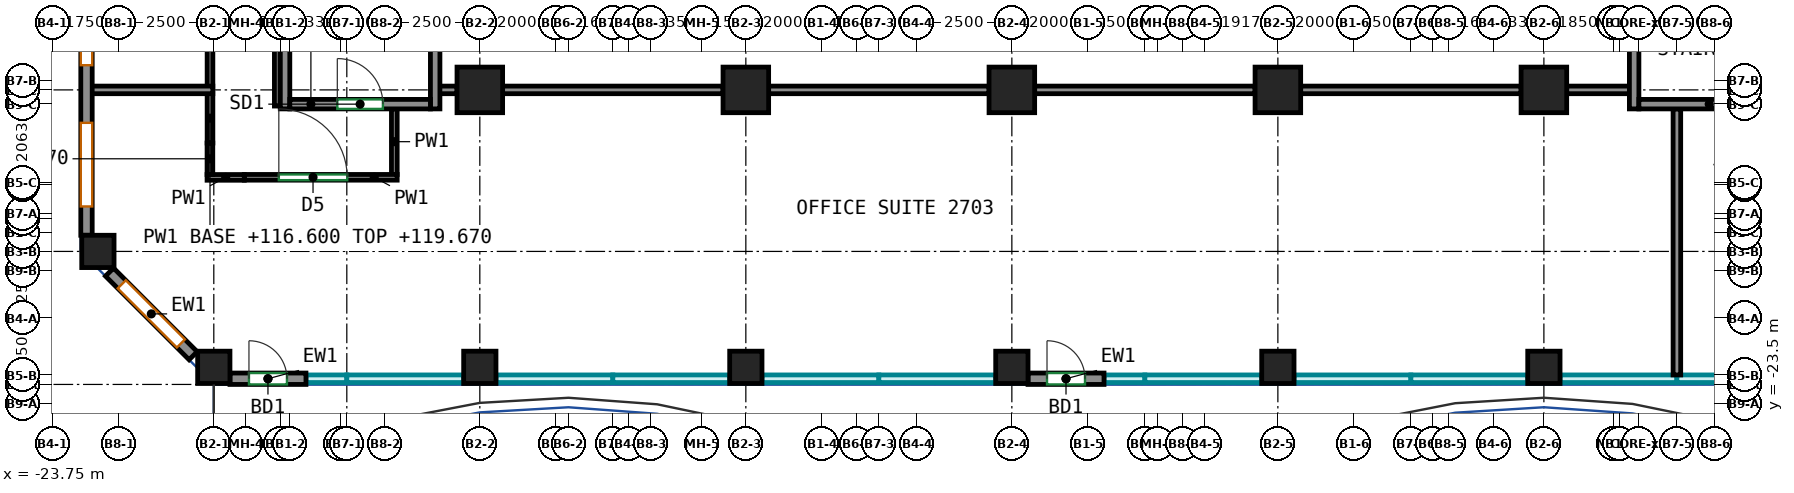
"""IFC4 building model, lengths in metres.
Left out: names, types, materials, properties, quantities, classifications, styles, units other than length and angle.
Written with IfcOpenShell. Run it as: python <this file> out.ifc"""

import sys

from ifc_helpers import new_model, si_unit, direction, frame, frame_2d, origin, origin_2d, place, context, subcontext, project, spatial, rectangle, extrude, source, transform, mapped, element, fill, save


model = new_model("IFC4")
c1 = context("Model", 3, precision=1e-05, world=origin(), true_north=direction((0.0, 1.0)))
c2 = subcontext(c1, "Body", "Model", "MODEL_VIEW")
j1 = project(units=[si_unit("LENGTHUNIT", "METRE"), si_unit("PLANEANGLEUNIT", "RADIAN")], contexts=[c1])
p1 = place(None, origin())
s1 = spatial("IfcSite", under=j1, at=p1, CompositionType="ELEMENT")
p2 = place(p1, origin())
s2 = spatial("IfcBuilding", under=s1, at=p2, CompositionType="ELEMENT")
p3 = place(p2, frame((0.0, 0.0, 116.6)))
s3 = spatial("IfcBuildingStorey", under=s2, at=p3, CompositionType="ELEMENT", Elevation=116.6)
m1 = source(origin(), c2, "Body", "SweptSolid", [
    extrude(rectangle(XDim=0.85, YDim=0.85, at=origin_2d()), origin(), (0.0, 0.0, 1.0), 3.72),
])
for number, where, z_axis, x_axis in (
    (1, (-22.55, -19.5, 0.0), (0.0, 0.0, 1.0), (1.0, 0.0, 0.0)),
    (2, (-19.5, -22.55, 0.0), (0.0, 0.0, 1.0), (1.0, 0.0, 0.0)),
    (3, (-12.5, -22.55, 0.0), (0.0, 0.0, 1.0), (1.0, 0.0, 0.0)),
):
    element("IfcColumn", number, at=place(p3, frame(where, z_axis=z_axis, x_axis=x_axis)), inside=s3, PredefinedType="COLUMN", context=c2, shape_type="MappedRepresentation", body=[
        mapped(m1, transform((0.0, 0.0, 0.0))),
    ])
m2 = source(origin(), c2, "Body", "SweptSolid", [
    extrude(rectangle(XDim=1.2, YDim=1.2, at=origin_2d()), origin(), (0.0, 0.0, 1.0), 3.72),
])
p4 = place(p3, frame((-12.5, -15.25, 0.0), z_axis=(0.0, 0.0, 1.0), x_axis=(1.0, 0.0, 0.0)))
e4 = element("IfcColumn", 4, at=p4, inside=s3, PredefinedType="COLUMN", context=c2, shape_type="MappedRepresentation", body=[
    mapped(m2, transform((0.0, 0.0, 0.0))),
])
p5 = place(p3, frame((-5.5, -22.55, 0.0), z_axis=(0.0, 0.0, 1.0), x_axis=(1.0, 0.0, 0.0)))
e5 = element("IfcColumn", 5, at=p5, inside=s3, PredefinedType="COLUMN", context=c2, shape_type="MappedRepresentation", body=[
    mapped(m1, transform((0.0, 0.0, 0.0))),
])
p6 = place(p3, frame((-5.5, -15.25, 0.0), z_axis=(0.0, 0.0, 1.0), x_axis=(1.0, 0.0, 0.0)))
e6 = element("IfcColumn", 6, at=p6, inside=s3, PredefinedType="COLUMN", context=c2, shape_type="MappedRepresentation", body=[
    mapped(m2, transform((0.0, 0.0, 0.0))),
])
p7 = place(p3, frame((1.5, -22.55, 0.0), z_axis=(0.0, 0.0, 1.0), x_axis=(1.0, 0.0, 0.0)))
e7 = element("IfcColumn", 7, at=p7, inside=s3, PredefinedType="COLUMN", context=c2, shape_type="MappedRepresentation", body=[
    mapped(m1, transform((0.0, 0.0, 0.0))),
])
p8 = place(p3, frame((1.5, -15.25, 0.0), z_axis=(0.0, 0.0, 1.0), x_axis=(1.0, 0.0, 0.0)))
e8 = element("IfcColumn", 8, at=p8, inside=s3, PredefinedType="COLUMN", context=c2, shape_type="MappedRepresentation", body=[
    mapped(m2, transform((0.0, 0.0, 0.0))),
])
p9 = place(p3, frame((8.5, -22.55, 0.0), z_axis=(0.0, 0.0, 1.0), x_axis=(1.0, 0.0, 0.0)))
e9 = element("IfcColumn", 9, at=p9, inside=s3, PredefinedType="COLUMN", context=c2, shape_type="MappedRepresentation", body=[
    mapped(m1, transform((0.0, 0.0, 0.0))),
])
p10 = place(p3, frame((8.5, -15.25, 0.0), z_axis=(0.0, 0.0, 1.0), x_axis=(1.0, 0.0, 0.0)))
e10 = element("IfcColumn", 10, at=p10, inside=s3, PredefinedType="COLUMN", context=c2, shape_type="MappedRepresentation", body=[
    mapped(m2, transform((0.0, 0.0, 0.0))),
])
p11 = place(p3, frame((15.5, -22.55, 0.0), z_axis=(0.0, 0.0, 1.0), x_axis=(1.0, 0.0, 0.0)))
e11 = element("IfcColumn", 11, at=p11, inside=s3, PredefinedType="COLUMN", context=c2, shape_type="MappedRepresentation", body=[
    mapped(m1, transform((0.0, 0.0, 0.0))),
])
p12 = place(p3, frame((15.5, -15.25, 0.0), z_axis=(0.0, 0.0, 1.0), x_axis=(1.0, 0.0, 0.0)))
e12 = element("IfcColumn", 12, at=p12, inside=s3, PredefinedType="COLUMN", context=c2, shape_type="MappedRepresentation", body=[
    mapped(m2, transform((0.0, 0.0, 0.0))),
])
m3 = source(origin(), c2, "Body", "SweptSolid", [
    extrude(rectangle(XDim=8.0, YDim=0.25, at=frame_2d((4.0, 0.0))), origin(), (0.0, 0.0, 1.0), 3.72),
])
for number, where, z_axis, x_axis in (
    (13, (-17.625, -15.75, 0.0), (0.0, 0.0, 1.0), (0.0, 1.0, 0.0)),
    (14, (-13.675, -15.75, 0.0), (0.0, 0.0, 1.0), (0.0, 1.0, 0.0)),
):
    element("IfcWall", number, at=place(p3, frame(where, z_axis=z_axis, x_axis=x_axis)), inside=s3, PredefinedType="SHEAR", context=c2, shape_type="MappedRepresentation", body=[
        mapped(m3, transform((0.0, 0.0, 0.0))),
    ])
m4 = source(origin(), c2, "Body", "SweptSolid", [
    extrude(rectangle(XDim=3.7, YDim=0.25, at=frame_2d((1.85, 0.0))), origin(), (0.0, 0.0, 1.0), 3.72),
])
p13 = place(p3, frame((-17.5, -15.625, 0.0), z_axis=(0.0, 0.0, 1.0), x_axis=(1.0, 0.0, 0.0)))
e15 = element("IfcWall", 15, at=p13, inside=s3, PredefinedType="SHEAR", context=c2, shape_type="MappedRepresentation", body=[
    mapped(m4, transform((0.0, 0.0, 0.0))),
])
p14 = place(p13, frame((1.25, 0.0, 0.0)))
e16 = element("IfcOpeningElement", 16, at=p14, cuts=e15, PredefinedType="OPENING", context=c2, shape_type="SweptSolid", body=[
    extrude(rectangle(XDim=1.2, YDim=2.1, at=frame_2d((0.6, 1.05))), frame((0.0, 0.135, 0.0), z_axis=(0.0, -1.0, 0.0), x_axis=(1.0, 0.0, 0.0)), (0.0, 0.0, 1.0), 0.27),
])
p15 = place(p3, frame((17.875, -15.75, 0.0), z_axis=(0.0, 0.0, 1.0), x_axis=(0.0, 1.0, 0.0)))
e17 = element("IfcWall", 17, at=p15, inside=s3, PredefinedType="SHEAR", context=c2, shape_type="MappedRepresentation", body=[
    mapped(m3, transform((0.0, 0.0, 0.0))),
])
p16 = place(p3, frame((18.0, -15.625, 0.0), z_axis=(0.0, 0.0, 1.0), x_axis=(1.0, 0.0, 0.0)))
e18 = element("IfcWall", 18, at=p16, inside=s3, PredefinedType="SHEAR", context=c2, shape_type="MappedRepresentation", body=[
    mapped(m4, transform((0.0, 0.0, 0.0))),
])
m5 = source(origin(), c2, "Body", "SweptSolid", [
    extrude(rectangle(XDim=2.0, YDim=0.3, at=frame_2d((1.0, 0.0))), origin(), (0.0, 0.0, 1.0), 3.72),
])
p17 = place(p3, frame((-19.075, -22.85, 0.0), z_axis=(0.0, 0.0, 1.0), x_axis=(1.0, 0.0, 0.0)))
e19 = element("IfcWall", 19, at=p17, inside=s3, PredefinedType="SOLIDWALL", context=c2, shape_type="MappedRepresentation", body=[
    mapped(m5, transform((0.0, 0.0, 0.0))),
])
p18 = place(p17, frame((0.5, 0.0, 0.0)))
e20 = element("IfcOpeningElement", 20, at=p18, cuts=e19, PredefinedType="OPENING", context=c2, shape_type="SweptSolid", body=[
    extrude(rectangle(XDim=1.0, YDim=2.1, at=frame_2d((0.5, 1.05))), frame((0.0, 0.16, 0.0), z_axis=(0.0, -1.0, 0.0), x_axis=(1.0, 0.0, 0.0)), (0.0, 0.0, 1.0), 0.32),
])
p19 = place(p3, frame((1.925, -22.85, 0.0), z_axis=(0.0, 0.0, 1.0), x_axis=(1.0, 0.0, 0.0)))
e21 = element("IfcWall", 21, at=p19, inside=s3, PredefinedType="SOLIDWALL", context=c2, shape_type="MappedRepresentation", body=[
    mapped(m5, transform((0.0, 0.0, 0.0))),
])
p20 = place(p19, frame((0.5, 0.0, 0.0)))
e22 = element("IfcOpeningElement", 22, at=p20, cuts=e21, PredefinedType="OPENING", context=c2, shape_type="SweptSolid", body=[
    extrude(rectangle(XDim=1.0, YDim=2.1, at=frame_2d((0.5, 1.05))), frame((0.0, 0.16, 0.0), z_axis=(0.0, -1.0, 0.0), x_axis=(1.0, 0.0, 0.0)), (0.0, 0.0, 1.0), 0.32),
])
m6 = source(origin(), c2, "Body", "SweptSolid", [
    extrude(rectangle(XDim=11.15, YDim=0.3, at=frame_2d((5.575, 0.0))), origin(), (0.0, 0.0, 1.0), 3.72),
])
p21 = place(p3, frame((-22.85, -7.925, 0.0), z_axis=(0.0, 0.0, 1.0), x_axis=(0.0, -1.0, 0.0)))
e23 = element("IfcWall", 23, at=p21, inside=s3, PredefinedType="SOLIDWALL", context=c2, shape_type="MappedRepresentation", body=[
    mapped(m6, transform((0.0, 0.0, 0.0))),
])
p22 = place(p21, frame((0.758, 0.0, 0.7)))
e24 = element("IfcOpeningElement", 24, at=p22, cuts=e23, PredefinedType="OPENING", context=c2, shape_type="SweptSolid", body=[
    extrude(rectangle(XDim=2.2, YDim=2.25, at=frame_2d((1.1, 1.125))), frame((0.0, 0.16, 0.0), z_axis=(0.0, -1.0, 0.0), x_axis=(1.0, 0.0, 0.0)), (0.0, 0.0, 1.0), 0.32),
])
p23 = place(p21, frame((4.475, 0.0, 0.7)))
e25 = element("IfcOpeningElement", 25, at=p23, cuts=e23, PredefinedType="OPENING", context=c2, shape_type="SweptSolid", body=[
    extrude(rectangle(XDim=2.2, YDim=2.25, at=frame_2d((1.1, 1.125))), frame((0.0, 0.16, 0.0), z_axis=(0.0, -1.0, 0.0), x_axis=(1.0, 0.0, 0.0)), (0.0, 0.0, 1.0), 0.32),
])
p24 = place(p21, frame((8.192, 0.0, 0.7)))
e26 = element("IfcOpeningElement", 26, at=p24, cuts=e23, PredefinedType="OPENING", context=c2, shape_type="SweptSolid", body=[
    extrude(rectangle(XDim=2.2, YDim=2.25, at=frame_2d((1.1, 1.125))), frame((0.0, 0.16, 0.0), z_axis=(0.0, -1.0, 0.0), x_axis=(1.0, 0.0, 0.0)), (0.0, 0.0, 1.0), 0.32),
])
m7 = source(origin(), c2, "Body", "SweptSolid", [
    extrude(rectangle(XDim=3.111, YDim=0.3, at=frame_2d((1.556, 0.0))), origin(), (0.0, 0.0, 1.0), 3.72),
])
p25 = place(p3, frame((-22.244, -20.044, 0.0), z_axis=(0.0, 0.0, 1.0), x_axis=(0.707106781187, -0.707106781187, 0.0)))
e27 = element("IfcWall", 27, at=p25, inside=s3, PredefinedType="SOLIDWALL", context=c2, shape_type="MappedRepresentation", body=[
    mapped(m7, transform((0.0, 0.0, 0.0))),
])
p26 = place(p25, frame((0.456, 0.0, 0.7)))
e28 = element("IfcOpeningElement", 28, at=p26, cuts=e27, PredefinedType="OPENING", context=c2, shape_type="SweptSolid", body=[
    extrude(rectangle(XDim=2.2, YDim=2.25, at=frame_2d((1.1, 1.125))), frame((0.0, 0.16, 0.0), z_axis=(0.0, -1.0, 0.0), x_axis=(1.0, 0.0, 0.0)), (0.0, 0.0, 1.0), 0.32),
])
p27 = place(p3, frame((-19.6, -15.16, 0.0), z_axis=(0.0, 0.0, 1.0), x_axis=(0.0, 1.0, 0.0)))
e29 = element("IfcWall", 29, at=p27, inside=s3, PredefinedType="PARTITIONING", context=c2, shape_type="SweptSolid", body=[
    extrude(rectangle(XDim=19.51, YDim=0.15, at=frame_2d((9.755, 0.0))), origin(), (0.0, 0.0, 1.0), 3.07),
])
p28 = place(p27, frame((2.801, 0.0, 0.0)))
e30 = element("IfcOpeningElement", 30, at=p28, cuts=e29, PredefinedType="OPENING", context=c2, shape_type="SweptSolid", body=[
    extrude(rectangle(XDim=1.0, YDim=2.1, at=frame_2d((0.5, 1.05))), frame((0.0, 0.085, 0.0), z_axis=(0.0, -1.0, 0.0), x_axis=(1.0, 0.0, 0.0)), (0.0, 0.0, 1.0), 0.17),
])
p29 = place(p3, frame((-17.83, -15.675, 0.0), z_axis=(0.0, 0.0, 1.0), x_axis=(0.0, 1.0, 0.0)))
e31 = element("IfcWall", 31, at=p29, inside=s3, PredefinedType="PARTITIONING", context=c2, shape_type="SweptSolid", body=[
    extrude(rectangle(XDim=11.96, YDim=0.15, at=frame_2d((5.98, 0.0))), origin(), (0.0, 0.0, 1.0), 3.72),
])
p30 = place(p29, frame((8.249, 0.0, 0.0)))
e32 = element("IfcOpeningElement", 32, at=p30, cuts=e31, PredefinedType="OPENING", context=c2, shape_type="SweptSolid", body=[
    extrude(rectangle(XDim=1.8, YDim=2.1, at=frame_2d((0.9, 1.05))), frame((0.0, 0.085, 0.0), z_axis=(0.0, -1.0, 0.0), x_axis=(1.0, 0.0, 0.0)), (0.0, 0.0, 1.0), 0.17),
])
p31 = place(p3, frame((-19.6, -16.648, 0.0), z_axis=(0.0, 0.0, 1.0), x_axis=(0.0, 1.0, 0.0)))
e33 = element("IfcWall", 33, at=p31, inside=s3, PredefinedType="PARTITIONING", context=c2, shape_type="SweptSolid", body=[
    extrude(rectangle(XDim=1.308, YDim=0.15, at=frame_2d((0.654, 0.0))), origin(), (0.0, 0.0, 1.0), 3.07),
])
p32 = place(p3, frame((-14.75, -17.475, 0.0), z_axis=(0.0, 0.0, 1.0), x_axis=(0.0, 1.0, 0.0)))
e34 = element("IfcWall", 34, at=p32, inside=s3, PredefinedType="PARTITIONING", context=c2, shape_type="SweptSolid", body=[
    extrude(rectangle(XDim=1.725, YDim=0.15, at=frame_2d((0.863, 0.0))), origin(), (0.0, 0.0, 1.0), 3.72),
])
p33 = place(p3, frame((-18.698, -17.55, 0.0), z_axis=(0.0, 0.0, 1.0), x_axis=(1.0, 0.0, 0.0)))
e35 = element("IfcWall", 35, at=p33, inside=s3, PredefinedType="PARTITIONING", context=c2, shape_type="SweptSolid", body=[
    extrude(rectangle(XDim=4.023, YDim=0.15, at=frame_2d((2.011, 0.0))), origin(), (0.0, 0.0, 1.0), 3.72),
])
p34 = place(p33, frame((0.909, 0.0, 0.0)))
e36 = element("IfcOpeningElement", 36, at=p34, cuts=e35, PredefinedType="OPENING", context=c2, shape_type="SweptSolid", body=[
    extrude(rectangle(XDim=1.8, YDim=2.1, at=frame_2d((0.9, 1.05))), frame((0.0, 0.085, 0.0), z_axis=(0.0, -1.0, 0.0), x_axis=(1.0, 0.0, 0.0)), (0.0, 0.0, 1.0), 0.17),
])
p35 = place(p3, frame((-19.677, -17.552, 0.0), z_axis=(0.0, 0.0, 1.0), x_axis=(1.0, 0.0, 0.0)))
e37 = element("IfcWall", 37, at=p35, inside=s3, PredefinedType="PARTITIONING", context=c2, shape_type="SweptSolid", body=[
    extrude(rectangle(XDim=0.979, YDim=0.15, at=frame_2d((0.49, 0.0))), origin(), (0.0, 0.0, 1.0), 3.72),
])
p36 = place(p3, frame((-19.602, -16.648, 0.0), z_axis=(0.0, 0.0, 1.0), x_axis=(0.0, -1.0, 0.0)))
e38 = element("IfcWall", 38, at=p36, inside=s3, PredefinedType="PARTITIONING", context=c2, shape_type="SweptSolid", body=[
    extrude(rectangle(XDim=0.829, YDim=0.15, at=frame_2d((0.415, 0.0))), origin(), (0.0, 0.0, 1.0), 3.07),
])
p37 = place(p3, frame((-22.75, -15.25, 0.0), z_axis=(0.0, 0.0, 1.0), x_axis=(1.0, 0.0, 0.0)))
e39 = element("IfcWall", 39, at=p37, inside=s3, PredefinedType="PARTITIONING", context=c2, shape_type="SweptSolid", body=[
    extrude(rectangle(XDim=3.224, YDim=0.2, at=frame_2d((1.612, 0.0))), origin(), (0.0, 0.0, 1.0), 3.72),
])
p38 = place(p3, frame((16.1, -15.25, 0.0), z_axis=(0.0, 0.0, 1.0), x_axis=(1.0, 0.0, 0.0)))
e40 = element("IfcWall", 40, at=p38, inside=s3, PredefinedType="PARTITIONING", context=c2, shape_type="SweptSolid", body=[
    extrude(rectangle(XDim=1.65, YDim=0.2, at=frame_2d((0.825, 0.0))), origin(), (0.0, 0.0, 1.0), 3.72),
])
for number, where, z_axis, x_axis in (
    (41, (9.1, -15.25, 0.0), (0.0, 0.0, 1.0), (1.0, 0.0, 0.0)),
    (42, (2.1, -15.25, 0.0), (0.0, 0.0, 1.0), (1.0, 0.0, 0.0)),
    (43, (-4.9, -15.25, 0.0), (0.0, 0.0, 1.0), (1.0, 0.0, 0.0)),
    (44, (-11.9, -15.25, 0.0), (0.0, 0.0, 1.0), (1.0, 0.0, 0.0)),
):
    element("IfcWall", number, at=place(p3, frame(where, z_axis=z_axis, x_axis=x_axis)), inside=s3, PredefinedType="PARTITIONING", context=c2, shape_type="SweptSolid", body=[
        extrude(rectangle(XDim=5.8, YDim=0.2, at=frame_2d((2.9, 0.0))), origin(), (0.0, 0.0, 1.0), 3.72),
    ])
p39 = place(p3, frame((-13.6, -15.25, 0.0), z_axis=(0.0, 0.0, 1.0), x_axis=(1.0, 0.0, 0.0)))
e45 = element("IfcWall", 45, at=p39, inside=s3, PredefinedType="PARTITIONING", context=c2, shape_type="SweptSolid", body=[
    extrude(rectangle(XDim=0.5, YDim=0.2, at=frame_2d((0.25, 0.0))), origin(), (0.0, 0.0, 1.0), 3.72),
])
p40 = place(p3, frame((19.0, -22.75, 0.0), z_axis=(0.0, 0.0, 1.0), x_axis=(0.0, 1.0, 0.0)))
e46 = element("IfcWall", 46, at=p40, inside=s3, PredefinedType="PARTITIONING", context=c2, shape_type="SweptSolid", body=[
    extrude(rectangle(XDim=7.0, YDim=0.2, at=frame_2d((3.5, 0.0))), origin(), (0.0, 0.0, 1.0), 3.72),
])
p41 = place(p18, origin())
e47 = element("IfcDoor", 47, at=p41, inside=s3, OperationType="SINGLE_SWING_LEFT", PredefinedType="DOOR", context=c2, shape_type="SweptSolid", body=[
    extrude(rectangle(XDim=1.0, YDim=2.1, at=frame_2d((0.5, 1.05))), frame((0.0, 0.025, 0.0), z_axis=(0.0, -1.0, 0.0), x_axis=(1.0, 0.0, 0.0)), (0.0, 0.0, 1.0), 0.05),
])
fill(e20, e47)
p42 = place(p20, origin())
e48 = element("IfcDoor", 48, at=p42, inside=s3, OperationType="SINGLE_SWING_LEFT", PredefinedType="DOOR", context=c2, shape_type="SweptSolid", body=[
    extrude(rectangle(XDim=1.0, YDim=2.1, at=frame_2d((0.5, 1.05))), frame((0.0, 0.025, 0.0), z_axis=(0.0, -1.0, 0.0), x_axis=(1.0, 0.0, 0.0)), (0.0, 0.0, 1.0), 0.05),
])
fill(e22, e48)
p43 = place(p23, origin())
e49 = element("IfcWindow", 49, at=p43, inside=s3, PartitioningType="SINGLE_PANEL", PredefinedType="WINDOW", context=c2, shape_type="SweptSolid", body=[
    extrude(rectangle(XDim=2.2, YDim=2.25, at=frame_2d((1.1, 1.125))), frame((0.0, 0.03, 0.0), z_axis=(0.0, -1.0, 0.0), x_axis=(1.0, 0.0, 0.0)), (0.0, 0.0, 1.0), 0.06),
])
fill(e25, e49)
p44 = place(p24, origin())
e50 = element("IfcWindow", 50, at=p44, inside=s3, PartitioningType="SINGLE_PANEL", PredefinedType="WINDOW", context=c2, shape_type="SweptSolid", body=[
    extrude(rectangle(XDim=2.2, YDim=2.25, at=frame_2d((1.1, 1.125))), frame((0.0, 0.03, 0.0), z_axis=(0.0, -1.0, 0.0), x_axis=(1.0, 0.0, 0.0)), (0.0, 0.0, 1.0), 0.06),
])
fill(e26, e50)
p45 = place(p26, origin())
e51 = element("IfcWindow", 51, at=p45, inside=s3, PartitioningType="SINGLE_PANEL", PredefinedType="WINDOW", context=c2, shape_type="SweptSolid", body=[
    extrude(rectangle(XDim=2.2, YDim=2.25, at=frame_2d((1.1, 1.125))), frame((0.0, 0.03, 0.0), z_axis=(0.0, -1.0, 0.0), x_axis=(1.0, 0.0, 0.0)), (0.0, 0.0, 1.0), 0.06),
])
fill(e28, e51)
p46 = place(p14, origin())
e52 = element("IfcDoor", 52, at=p46, inside=s3, OperationType="DOUBLE_DOOR_SINGLE_SWING", PredefinedType="DOOR", context=c2, shape_type="SweptSolid", body=[
    extrude(rectangle(XDim=1.2, YDim=2.1, at=frame_2d((0.6, 1.05))), frame((0.0, 0.025, 0.0), z_axis=(0.0, -1.0, 0.0), x_axis=(1.0, 0.0, 0.0)), (0.0, 0.0, 1.0), 0.05),
])
fill(e16, e52)
p47 = place(p34, origin())
e53 = element("IfcDoor", 53, at=p47, inside=s3, OperationType="DOUBLE_DOOR_SINGLE_SWING", PredefinedType="DOOR", context=c2, shape_type="SweptSolid", body=[
    extrude(rectangle(XDim=1.8, YDim=2.1, at=frame_2d((0.9, 1.05))), frame((0.0, 0.025, 0.0), z_axis=(0.0, -1.0, 0.0), x_axis=(1.0, 0.0, 0.0)), (0.0, 0.0, 1.0), 0.05),
])
fill(e36, e53)
save(model, sys.argv[1])
